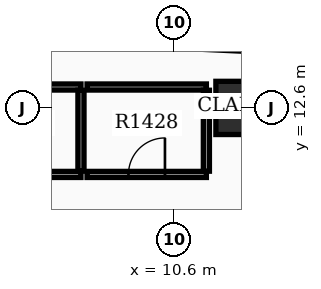
"""IFC4 building model, lengths in metres.
Left out: names, types, materials, properties, quantities, classifications, styles, units other than length and angle.
Written with IfcOpenShell. Run it as: python <this file> out.ifc"""

import sys

from ifc_helpers import new_model, si_unit, direction, frame, frame_2d, origin, origin_2d, place, context, subcontext, project, spatial, rectangle, extrude, element, fill, save


model = new_model("IFC4")
c1 = context("Model", 3, precision=1e-05, world=origin(), true_north=direction((0.0, 1.0)))
c2 = subcontext(c1, "Body", "Model", "MODEL_VIEW")
j1 = project(units=[si_unit("LENGTHUNIT", "METRE"), si_unit("PLANEANGLEUNIT", "RADIAN")], contexts=[c1])
p1 = place(None, origin())
s1 = spatial("IfcSite", under=j1, at=p1, CompositionType="ELEMENT")
p2 = place(p1, origin())
s2 = spatial("IfcBuilding", under=s1, at=p2, CompositionType="ELEMENT")
p3 = place(p2, frame((0.0, 0.0, 91.2)))
s3 = spatial("IfcBuildingStorey", under=s2, at=p3, CompositionType="ELEMENT", Elevation=91.2)
p4 = place(p3, frame((12.4, 12.6, 0.0), z_axis=(0.0, 0.0, 1.0), x_axis=(1.0, 0.0, 0.0)))
e1 = element("IfcColumn", 1, at=p4, inside=s3, PredefinedType="COLUMN", context=c2, shape_type="SweptSolid", body=[
    extrude(rectangle(XDim=1.4, YDim=1.4, at=origin_2d()), origin(), (0.0, 0.0, 1.0), 3.9),
])
p5 = place(p3, frame((13.843, 14.164, 0.0), z_axis=(0.0, 0.0, 1.0), x_axis=(-0.998889082162, 0.047123258997, 0.0)))
e2 = element("IfcWall", 2, at=p5, inside=s3, PredefinedType="STANDARD", context=c2, shape_type="SweptSolid", body=[
    extrude(rectangle(XDim=6.3, YDim=0.28, at=frame_2d((3.15, 0.0))), origin(), (0.0, 0.0, 1.0), 2.86),
])
p6 = place(p3, frame((4.95, 10.85, 0.0), z_axis=(0.0, 0.0, 1.0), x_axis=(1.0, 0.0, 0.0)))
e3 = element("IfcWall", 3, at=p6, inside=s3, PredefinedType="PARTITIONING", context=c2, shape_type="SweptSolid", body=[
    extrude(rectangle(XDim=3.2, YDim=0.16, at=frame_2d((1.6, 0.0))), origin(), (0.0, 0.0, 1.0), 2.85),
])
p7 = place(p6, frame((1.12, 0.0, 0.0)))
e4 = element("IfcOpeningElement", 4, at=p7, cuts=e3, PredefinedType="OPENING", context=c2, shape_type="SweptSolid", body=[
    extrude(rectangle(XDim=0.96, YDim=2.15, at=frame_2d((0.48, 1.075))), frame((0.0, 0.09, 0.0), z_axis=(0.0, -1.0, 0.0), x_axis=(1.0, 0.0, 0.0)), (0.0, 0.0, 1.0), 0.18),
])
p8 = place(p3, frame((4.95, 13.15, 0.0), z_axis=(0.0, 0.0, 1.0), x_axis=(1.0, 0.0, 0.0)))
e5 = element("IfcWall", 5, at=p8, inside=s3, PredefinedType="PARTITIONING", context=c2, shape_type="SweptSolid", body=[
    extrude(rectangle(XDim=3.2, YDim=0.16, at=frame_2d((1.6, 0.0))), origin(), (0.0, 0.0, 1.0), 2.85),
])
p9 = place(p3, frame((8.15, 10.935, 0.0), z_axis=(0.0, 0.0, 1.0), x_axis=(0.0, 1.0, 0.0)))
e6 = element("IfcWall", 6, at=p9, inside=s3, PredefinedType="PARTITIONING", context=c2, shape_type="SweptSolid", body=[
    extrude(rectangle(XDim=2.13, YDim=0.16, at=frame_2d((1.065, 0.0))), origin(), (0.0, 0.0, 1.0), 2.85),
])
p10 = place(p3, frame((8.31, 10.85, 0.0), z_axis=(0.0, 0.0, 1.0), x_axis=(1.0, 0.0, 0.0)))
e7 = element("IfcWall", 7, at=p10, inside=s3, PredefinedType="PARTITIONING", context=c2, shape_type="SweptSolid", body=[
    extrude(rectangle(XDim=3.14, YDim=0.16, at=frame_2d((1.57, 0.0))), origin(), (0.0, 0.0, 1.0), 2.85),
])
p11 = place(p10, frame((1.09, 0.0, 0.0)))
e8 = element("IfcOpeningElement", 8, at=p11, cuts=e7, PredefinedType="OPENING", context=c2, shape_type="SweptSolid", body=[
    extrude(rectangle(XDim=0.96, YDim=2.15, at=frame_2d((0.48, 1.075))), frame((0.0, 0.09, 0.0), z_axis=(0.0, -1.0, 0.0), x_axis=(1.0, 0.0, 0.0)), (0.0, 0.0, 1.0), 0.18),
])
p12 = place(p3, frame((8.31, 13.15, 0.0), z_axis=(0.0, 0.0, 1.0), x_axis=(1.0, 0.0, 0.0)))
e9 = element("IfcWall", 9, at=p12, inside=s3, PredefinedType="PARTITIONING", context=c2, shape_type="SweptSolid", body=[
    extrude(rectangle(XDim=3.14, YDim=0.16, at=frame_2d((1.57, 0.0))), origin(), (0.0, 0.0, 1.0), 2.85),
])
p13 = place(p3, frame((11.45, 10.935, 0.0), z_axis=(0.0, 0.0, 1.0), x_axis=(0.0, 1.0, 0.0)))
e10 = element("IfcWall", 10, at=p13, inside=s3, PredefinedType="PARTITIONING", context=c2, shape_type="SweptSolid", body=[
    extrude(rectangle(XDim=2.13, YDim=0.16, at=frame_2d((1.065, 0.0))), origin(), (0.0, 0.0, 1.0), 2.85),
])
p14 = place(p11, origin())
e11 = element("IfcDoor", 11, at=p14, inside=s3, OperationType="SINGLE_SWING_RIGHT", PredefinedType="DOOR", context=c2, shape_type="SweptSolid", body=[
    extrude(rectangle(XDim=0.96, YDim=2.15, at=frame_2d((0.48, 1.075))), frame((0.0, 0.025, 0.0), z_axis=(0.0, -1.0, 0.0), x_axis=(1.0, 0.0, 0.0)), (0.0, 0.0, 1.0), 0.05),
])
fill(e8, e11)
save(model, sys.argv[1])
